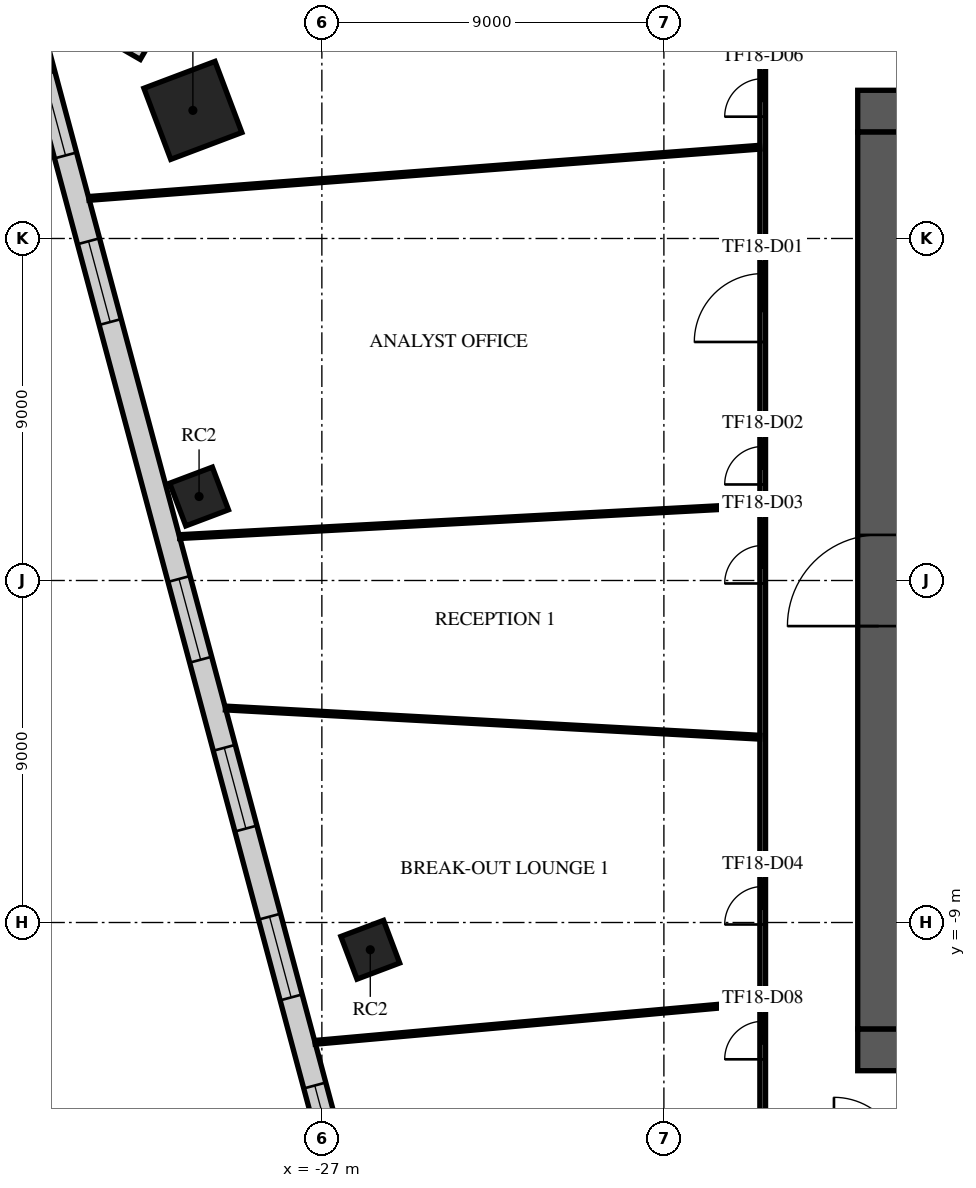
"""IFC4 building model, lengths in metres.
Left out: names, types, materials, properties, quantities, classifications, styles, units other than length and angle.
Written with IfcOpenShell. Run it as: python <this file> out.ifc"""

import sys

from ifc_helpers import new_model, si_unit, direction, frame, frame_2d, origin, origin_2d, place, context, subcontext, project, spatial, rectangle, extrude, element, fill, save


model = new_model("IFC4")
c1 = context("Model", 3, precision=1e-05, world=origin(), true_north=direction((0.0, 1.0)))
c2 = subcontext(c1, "Body", "Model", "MODEL_VIEW")
j1 = project(units=[si_unit("LENGTHUNIT", "METRE"), si_unit("PLANEANGLEUNIT", "RADIAN")], contexts=[c1])
p1 = place(None, origin())
s1 = spatial("IfcSite", under=j1, at=p1, CompositionType="ELEMENT")
p2 = place(p1, origin())
s2 = spatial("IfcBuilding", under=s1, at=p2, CompositionType="ELEMENT")
p3 = place(p2, frame((0.0, 0.0, 86.1)))
s3 = spatial("IfcBuildingStorey", under=s2, at=p3, CompositionType="ELEMENT", Elevation=86.1)
p4 = place(p3, frame((-30.394, 12.371, 0.0), z_axis=(0.0, 0.0, 1.0), x_axis=(0.935491525991, 0.353349125935, 0.0)))
e1 = element("IfcColumn", 1, at=p4, inside=s3, PredefinedType="COLUMN", context=c2, shape_type="SweptSolid", body=[
    extrude(rectangle(XDim=2.0, YDim=2.0, at=origin_2d()), origin(), (0.0, 0.0, 1.0), 4.0),
])
for number, where, z_axis, x_axis in (
    (2, (-30.231, 2.21, 0.0), (0.0, 0.0, 1.0), (0.935, 0.353, 0.0)),
    (3, (-25.726, -9.717, 0.0), (0.0, 0.0, 1.0), (0.935, 0.353, 0.0)),
):
    element("IfcColumn", number, at=place(p3, frame(where, z_axis=z_axis, x_axis=x_axis)), inside=s3, PredefinedType="COLUMN", context=c2, shape_type="SweptSolid", body=[
        extrude(rectangle(XDim=1.2, YDim=1.2, at=origin_2d()), origin(), (0.0, 0.0, 1.0), 4.0),
    ])
p5 = place(p3, frame((-12.9, 12.35, 0.0), z_axis=(0.0, 0.0, 1.0), x_axis=(1.0, 0.0, 0.0)))
e4 = element("IfcWall", 4, at=p5, inside=s3, PredefinedType="SHEAR", context=c2, shape_type="SweptSolid", body=[
    extrude(rectangle(XDim=25.8, YDim=1.1, at=frame_2d((12.9, 0.0))), origin(), (0.0, 0.0, 1.0), 3.58),
])
p6 = place(p5, frame((11.7, 0.0, 0.0)))
e5 = element("IfcOpeningElement", 5, at=p6, cuts=e4, PredefinedType="OPENING", context=c2, shape_type="SweptSolid", body=[
    extrude(rectangle(XDim=2.4, YDim=2.4, at=frame_2d((1.2, 1.2))), frame((0.0, 0.56, 0.0), z_axis=(0.0, -1.0, 0.0), x_axis=(1.0, 0.0, 0.0)), (0.0, 0.0, 1.0), 1.12),
])
p7 = place(p5, frame((22.525, 0.0, 0.0)))
e6 = element("IfcOpeningElement", 6, at=p7, cuts=e4, PredefinedType="OPENING", context=c2, shape_type="SweptSolid", body=[
    extrude(rectangle(XDim=1.2, YDim=2.1, at=frame_2d((0.6, 1.05))), frame((0.0, 0.56, 0.0), z_axis=(0.0, -1.0, 0.0), x_axis=(1.0, 0.0, 0.0)), (0.0, 0.0, 1.0), 1.12),
])
p8 = place(p5, frame((1.5, 0.0, 0.0)))
e7 = element("IfcOpeningElement", 7, at=p8, cuts=e4, PredefinedType="OPENING", context=c2, shape_type="SweptSolid", body=[
    extrude(rectangle(XDim=1.0, YDim=2.1, at=frame_2d((0.5, 1.05))), frame((0.0, 0.56, 0.0), z_axis=(0.0, -1.0, 0.0), x_axis=(1.0, 0.0, 0.0)), (0.0, 0.0, 1.0), 1.12),
])
p9 = place(p3, frame((-12.9, -12.35, 0.0), z_axis=(0.0, 0.0, 1.0), x_axis=(1.0, 0.0, 0.0)))
e8 = element("IfcWall", 8, at=p9, inside=s3, PredefinedType="SHEAR", context=c2, shape_type="SweptSolid", body=[
    extrude(rectangle(XDim=25.8, YDim=1.1, at=frame_2d((12.9, 0.0))), origin(), (0.0, 0.0, 1.0), 3.58),
])
p10 = place(p9, frame((7.8, 0.0, 0.0)))
e9 = element("IfcOpeningElement", 9, at=p10, cuts=e8, PredefinedType="OPENING", context=c2, shape_type="SweptSolid", body=[
    extrude(rectangle(XDim=2.0, YDim=2.1, at=frame_2d((1.0, 1.05))), frame((0.0, 0.56, 0.0), z_axis=(0.0, -1.0, 0.0), x_axis=(1.0, 0.0, 0.0)), (0.0, 0.0, 1.0), 1.12),
])
p11 = place(p9, frame((17.925, 0.0, 0.0)))
e10 = element("IfcOpeningElement", 10, at=p11, cuts=e8, PredefinedType="OPENING", context=c2, shape_type="SweptSolid", body=[
    extrude(rectangle(XDim=1.2, YDim=2.1, at=frame_2d((0.6, 1.05))), frame((0.0, 0.56, 0.0), z_axis=(0.0, -1.0, 0.0), x_axis=(1.0, 0.0, 0.0)), (0.0, 0.0, 1.0), 1.12),
])
p12 = place(p9, frame((2.075, 0.0, 0.0)))
e11 = element("IfcOpeningElement", 11, at=p12, cuts=e8, PredefinedType="OPENING", context=c2, shape_type="SweptSolid", body=[
    extrude(rectangle(XDim=1.2, YDim=2.1, at=frame_2d((0.6, 1.05))), frame((0.0, 0.56, 0.0), z_axis=(0.0, -1.0, 0.0), x_axis=(1.0, 0.0, 0.0)), (0.0, 0.0, 1.0), 1.12),
])
p13 = place(p9, frame((22.525, 0.0, 0.0)))
e12 = element("IfcOpeningElement", 12, at=p13, cuts=e8, PredefinedType="OPENING", context=c2, shape_type="SweptSolid", body=[
    extrude(rectangle(XDim=1.2, YDim=2.1, at=frame_2d((0.6, 1.05))), frame((0.0, 0.56, 0.0), z_axis=(0.0, -1.0, 0.0), x_axis=(1.0, 0.0, 0.0)), (0.0, 0.0, 1.0), 1.12),
])
p14 = place(p3, frame((-12.35, -11.8, 0.0), z_axis=(0.0, 0.0, 1.0), x_axis=(0.0, 1.0, 0.0)))
e13 = element("IfcWall", 13, at=p14, inside=s3, PredefinedType="SHEAR", context=c2, shape_type="SweptSolid", body=[
    extrude(rectangle(XDim=23.6, YDim=1.1, at=frame_2d((11.8, 0.0))), origin(), (0.0, 0.0, 1.0), 3.58),
])
p15 = place(p14, frame((10.6, 0.0, 0.0)))
e14 = element("IfcOpeningElement", 14, at=p15, cuts=e13, PredefinedType="OPENING", context=c2, shape_type="SweptSolid", body=[
    extrude(rectangle(XDim=2.4, YDim=2.4, at=frame_2d((1.2, 1.2))), frame((0.0, 0.56, 0.0), z_axis=(0.0, -1.0, 0.0), x_axis=(1.0, 0.0, 0.0)), (0.0, 0.0, 1.0), 1.12),
])
p16 = place(p3, frame((-31.628, 13.972, 0.0), z_axis=(0.0, 0.0, 1.0), x_axis=(-0.866022959057, 0.500004234368, 0.0)))
e15 = element("IfcWall", 15, at=p16, inside=s3, PredefinedType="STANDARD", context=c2, shape_type="SweptSolid", body=[
    extrude(rectangle(XDim=2.5, YDim=0.6, at=frame_2d((1.25, 0.0))), origin(), (0.0, 0.0, 1.0), 3.58),
])
p17 = place(p3, frame((-34.609, 14.409, 0.0), z_axis=(0.0, 0.0, 1.0), x_axis=(0.258818949408, -0.96592585193, 0.0)))
e16 = element("IfcWall", 16, at=p17, inside=s3, PredefinedType="STANDARD", context=c2, shape_type="SweptSolid", body=[
    extrude(rectangle(XDim=45.751, YDim=0.6, at=frame_2d((22.875, 0.0))), origin(), (0.0, 0.0, 1.0), 3.58),
])
p18 = place(p17, frame((1.138, 0.0, 0.9)))
e17 = element("IfcOpeningElement", 17, at=p18, cuts=e16, PredefinedType="OPENING", context=c2, shape_type="SweptSolid", body=[
    extrude(rectangle(XDim=2.2, YDim=2.1, at=frame_2d((1.1, 1.05))), frame((0.0, 0.31, 0.0), z_axis=(0.0, -1.0, 0.0), x_axis=(1.0, 0.0, 0.0)), (0.0, 0.0, 1.0), 0.62),
])
p19 = place(p17, frame((5.676, 0.0, 0.9)))
e18 = element("IfcOpeningElement", 18, at=p19, cuts=e16, PredefinedType="OPENING", context=c2, shape_type="SweptSolid", body=[
    extrude(rectangle(XDim=2.2, YDim=2.1, at=frame_2d((1.1, 1.05))), frame((0.0, 0.31, 0.0), z_axis=(0.0, -1.0, 0.0), x_axis=(1.0, 0.0, 0.0)), (0.0, 0.0, 1.0), 0.62),
])
p20 = place(p17, frame((14.876, 0.0, 0.9)))
e19 = element("IfcOpeningElement", 19, at=p20, cuts=e16, PredefinedType="OPENING", context=c2, shape_type="SweptSolid", body=[
    extrude(rectangle(XDim=2.2, YDim=2.1, at=frame_2d((1.1, 1.05))), frame((0.0, 0.31, 0.0), z_axis=(0.0, -1.0, 0.0), x_axis=(1.0, 0.0, 0.0)), (0.0, 0.0, 1.0), 0.62),
])
p21 = place(p17, frame((19.476, 0.0, 0.9)))
e20 = element("IfcOpeningElement", 20, at=p21, cuts=e16, PredefinedType="OPENING", context=c2, shape_type="SweptSolid", body=[
    extrude(rectangle(XDim=2.2, YDim=2.1, at=frame_2d((1.1, 1.05))), frame((0.0, 0.31, 0.0), z_axis=(0.0, -1.0, 0.0), x_axis=(1.0, 0.0, 0.0)), (0.0, 0.0, 1.0), 0.62),
])
p22 = place(p17, frame((24.076, 0.0, 0.9)))
e21 = element("IfcOpeningElement", 21, at=p22, cuts=e16, PredefinedType="OPENING", context=c2, shape_type="SweptSolid", body=[
    extrude(rectangle(XDim=2.2, YDim=2.1, at=frame_2d((1.1, 1.05))), frame((0.0, 0.31, 0.0), z_axis=(0.0, -1.0, 0.0), x_axis=(1.0, 0.0, 0.0)), (0.0, 0.0, 1.0), 0.62),
])
p23 = place(p17, frame((28.676, 0.0, 0.9)))
e22 = element("IfcOpeningElement", 22, at=p23, cuts=e16, PredefinedType="OPENING", context=c2, shape_type="SweptSolid", body=[
    extrude(rectangle(XDim=2.2, YDim=2.1, at=frame_2d((1.1, 1.05))), frame((0.0, 0.31, 0.0), z_axis=(0.0, -1.0, 0.0), x_axis=(1.0, 0.0, 0.0)), (0.0, 0.0, 1.0), 0.62),
])
p24 = place(p17, frame((33.276, 0.0, 0.9)))
e23 = element("IfcOpeningElement", 23, at=p24, cuts=e16, PredefinedType="OPENING", context=c2, shape_type="SweptSolid", body=[
    extrude(rectangle(XDim=2.2, YDim=2.1, at=frame_2d((1.1, 1.05))), frame((0.0, 0.31, 0.0), z_axis=(0.0, -1.0, 0.0), x_axis=(1.0, 0.0, 0.0)), (0.0, 0.0, 1.0), 0.62),
])
p25 = place(p17, frame((37.876, 0.0, 0.9)))
e24 = element("IfcOpeningElement", 24, at=p25, cuts=e16, PredefinedType="OPENING", context=c2, shape_type="SweptSolid", body=[
    extrude(rectangle(XDim=2.2, YDim=2.1, at=frame_2d((1.1, 1.05))), frame((0.0, 0.31, 0.0), z_axis=(0.0, -1.0, 0.0), x_axis=(1.0, 0.0, 0.0)), (0.0, 0.0, 1.0), 0.62),
])
p26 = place(p17, frame((42.414, 0.0, 0.9)))
e25 = element("IfcOpeningElement", 25, at=p26, cuts=e16, PredefinedType="OPENING", context=c2, shape_type="SweptSolid", body=[
    extrude(rectangle(XDim=2.2, YDim=2.1, at=frame_2d((1.1, 1.05))), frame((0.0, 0.31, 0.0), z_axis=(0.0, -1.0, 0.0), x_axis=(1.0, 0.0, 0.0)), (0.0, 0.0, 1.0), 0.62),
])
p27 = place(p3, frame((-15.4, -15.4, 0.0), z_axis=(0.0, 0.0, 1.0), x_axis=(0.0, 1.0, 0.0)))
e26 = element("IfcWall", 26, at=p27, inside=s3, PredefinedType="PARTITIONING", context=c2, shape_type="SweptSolid", body=[
    extrude(rectangle(XDim=30.8, YDim=0.15, at=frame_2d((15.4, 0.0))), origin(), (0.0, 0.0, 1.0), 3.08),
])
p28 = place(p27, frame((21.677, 0.0, 0.0)))
e27 = element("IfcOpeningElement", 27, at=p28, cuts=e26, PredefinedType="OPENING", context=c2, shape_type="SweptSolid", body=[
    extrude(rectangle(XDim=1.8, YDim=2.1, at=frame_2d((0.9, 1.05))), frame((0.0, 0.085, 0.0), z_axis=(0.0, -1.0, 0.0), x_axis=(1.0, 0.0, 0.0)), (0.0, 0.0, 1.0), 0.17),
])
p29 = place(p27, frame((17.927, 0.0, 0.0)))
e28 = element("IfcOpeningElement", 28, at=p29, cuts=e26, PredefinedType="OPENING", context=c2, shape_type="SweptSolid", body=[
    extrude(rectangle(XDim=1.0, YDim=2.1, at=frame_2d((0.5, 1.05))), frame((0.0, 0.085, 0.0), z_axis=(0.0, -1.0, 0.0), x_axis=(1.0, 0.0, 0.0)), (0.0, 0.0, 1.0), 0.17),
])
p30 = place(p27, frame((15.322, 0.0, 0.0)))
e29 = element("IfcOpeningElement", 29, at=p30, cuts=e26, PredefinedType="OPENING", context=c2, shape_type="SweptSolid", body=[
    extrude(rectangle(XDim=1.0, YDim=2.1, at=frame_2d((0.5, 1.05))), frame((0.0, 0.085, 0.0), z_axis=(0.0, -1.0, 0.0), x_axis=(1.0, 0.0, 0.0)), (0.0, 0.0, 1.0), 0.17),
])
p31 = place(p27, frame((6.348, 0.0, 0.0)))
e30 = element("IfcOpeningElement", 30, at=p31, cuts=e26, PredefinedType="OPENING", context=c2, shape_type="SweptSolid", body=[
    extrude(rectangle(XDim=1.0, YDim=2.1, at=frame_2d((0.5, 1.05))), frame((0.0, 0.085, 0.0), z_axis=(0.0, -1.0, 0.0), x_axis=(1.0, 0.0, 0.0)), (0.0, 0.0, 1.0), 0.17),
])
p32 = place(p27, frame((27.605, 0.0, 0.0)))
e31 = element("IfcOpeningElement", 31, at=p32, cuts=e26, PredefinedType="OPENING", context=c2, shape_type="SweptSolid", body=[
    extrude(rectangle(XDim=1.0, YDim=2.1, at=frame_2d((0.5, 1.05))), frame((0.0, 0.085, 0.0), z_axis=(0.0, -1.0, 0.0), x_axis=(1.0, 0.0, 0.0)), (0.0, 0.0, 1.0), 0.17),
])
p33 = place(p27, frame((2.8, 0.0, 0.0)))
e32 = element("IfcOpeningElement", 32, at=p33, cuts=e26, PredefinedType="OPENING", context=c2, shape_type="SweptSolid", body=[
    extrude(rectangle(XDim=1.0, YDim=2.1, at=frame_2d((0.5, 1.05))), frame((0.0, 0.085, 0.0), z_axis=(0.0, -1.0, 0.0), x_axis=(1.0, 0.0, 0.0)), (0.0, 0.0, 1.0), 0.17),
])
p34 = place(p3, frame((-33.129, 10.055, 0.0), z_axis=(0.0, 0.0, 1.0), x_axis=(0.997098857085, 0.076117469739, 0.0)))
e33 = element("IfcWall", 33, at=p34, inside=s3, PredefinedType="PARTITIONING", context=c2, shape_type="SweptSolid", body=[
    extrude(rectangle(XDim=17.702, YDim=0.1, at=frame_2d((8.851, 0.0))), origin(), (0.0, 0.0, 1.0), 3.58),
])
p35 = place(p3, frame((-30.744, 1.155, 0.0), z_axis=(0.0, 0.0, 1.0), x_axis=(0.998561238881, 0.053623243142, 0.0)))
e34 = element("IfcWall", 34, at=p35, inside=s3, PredefinedType="PARTITIONING", context=c2, shape_type="SweptSolid", body=[
    extrude(rectangle(XDim=15.289, YDim=0.1, at=frame_2d((7.644, 0.0))), origin(), (0.0, 0.0, 1.0), 2.96),
])
p36 = place(p3, frame((-29.536, -3.355, 0.0), z_axis=(0.0, 0.0, 1.0), x_axis=(0.998509889637, -0.054571057322, 0.0)))
e35 = element("IfcWall", 35, at=p36, inside=s3, PredefinedType="PARTITIONING", context=c2, shape_type="SweptSolid", body=[
    extrude(rectangle(XDim=14.079, YDim=0.1, at=frame_2d((7.04, 0.0))), origin(), (0.0, 0.0, 1.0), 3.08),
])
p37 = place(p3, frame((-27.178, -12.154, 0.0), z_axis=(0.0, 0.0, 1.0), x_axis=(0.996016470741, 0.089169445512, 0.0)))
e36 = element("IfcWall", 36, at=p37, inside=s3, PredefinedType="PARTITIONING", context=c2, shape_type="SweptSolid", body=[
    extrude(rectangle(XDim=11.746, YDim=0.1, at=frame_2d((5.873, 0.0))), origin(), (0.0, 0.0, 1.0), 3.58),
])
p38 = place(p15, origin())
e37 = element("IfcDoor", 37, at=p38, inside=s3, OperationType="SINGLE_SWING_LEFT", PredefinedType="DOOR", context=c2, shape_type="SweptSolid", body=[
    extrude(rectangle(XDim=2.4, YDim=2.4, at=frame_2d((1.2, 1.2))), frame((0.0, 0.025, 0.0), z_axis=(0.0, -1.0, 0.0), x_axis=(1.0, 0.0, 0.0)), (0.0, 0.0, 1.0), 0.05),
])
fill(e14, e37)
p39 = place(p18, origin())
e38 = element("IfcWindow", 38, at=p39, inside=s3, PartitioningType="SINGLE_PANEL", PredefinedType="WINDOW", context=c2, shape_type="SweptSolid", body=[
    extrude(rectangle(XDim=2.2, YDim=2.1, at=frame_2d((1.1, 1.05))), frame((0.0, 0.03, 0.0), z_axis=(0.0, -1.0, 0.0), x_axis=(1.0, 0.0, 0.0)), (0.0, 0.0, 1.0), 0.06),
])
fill(e17, e38)
p40 = place(p19, origin())
e39 = element("IfcWindow", 39, at=p40, inside=s3, PartitioningType="SINGLE_PANEL", PredefinedType="WINDOW", context=c2, shape_type="SweptSolid", body=[
    extrude(rectangle(XDim=2.2, YDim=2.1, at=frame_2d((1.1, 1.05))), frame((0.0, 0.03, 0.0), z_axis=(0.0, -1.0, 0.0), x_axis=(1.0, 0.0, 0.0)), (0.0, 0.0, 1.0), 0.06),
])
fill(e18, e39)
p41 = place(p20, origin())
e40 = element("IfcWindow", 40, at=p41, inside=s3, PartitioningType="SINGLE_PANEL", PredefinedType="WINDOW", context=c2, shape_type="SweptSolid", body=[
    extrude(rectangle(XDim=2.2, YDim=2.1, at=frame_2d((1.1, 1.05))), frame((0.0, 0.03, 0.0), z_axis=(0.0, -1.0, 0.0), x_axis=(1.0, 0.0, 0.0)), (0.0, 0.0, 1.0), 0.06),
])
fill(e19, e40)
p42 = place(p21, origin())
e41 = element("IfcWindow", 41, at=p42, inside=s3, PartitioningType="SINGLE_PANEL", PredefinedType="WINDOW", context=c2, shape_type="SweptSolid", body=[
    extrude(rectangle(XDim=2.2, YDim=2.1, at=frame_2d((1.1, 1.05))), frame((0.0, 0.03, 0.0), z_axis=(0.0, -1.0, 0.0), x_axis=(1.0, 0.0, 0.0)), (0.0, 0.0, 1.0), 0.06),
])
fill(e20, e41)
p43 = place(p22, origin())
e42 = element("IfcWindow", 42, at=p43, inside=s3, PartitioningType="SINGLE_PANEL", PredefinedType="WINDOW", context=c2, shape_type="SweptSolid", body=[
    extrude(rectangle(XDim=2.2, YDim=2.1, at=frame_2d((1.1, 1.05))), frame((0.0, 0.03, 0.0), z_axis=(0.0, -1.0, 0.0), x_axis=(1.0, 0.0, 0.0)), (0.0, 0.0, 1.0), 0.06),
])
fill(e21, e42)
p44 = place(p23, origin())
e43 = element("IfcWindow", 43, at=p44, inside=s3, PartitioningType="SINGLE_PANEL", PredefinedType="WINDOW", context=c2, shape_type="SweptSolid", body=[
    extrude(rectangle(XDim=2.2, YDim=2.1, at=frame_2d((1.1, 1.05))), frame((0.0, 0.03, 0.0), z_axis=(0.0, -1.0, 0.0), x_axis=(1.0, 0.0, 0.0)), (0.0, 0.0, 1.0), 0.06),
])
fill(e22, e43)
p45 = place(p28, origin())
e44 = element("IfcDoor", 44, at=p45, inside=s3, OperationType="DOUBLE_DOOR_SINGLE_SWING", PredefinedType="DOOR", context=c2, shape_type="SweptSolid", body=[
    extrude(rectangle(XDim=1.8, YDim=2.1, at=frame_2d((0.9, 1.05))), frame((0.0, 0.025, 0.0), z_axis=(0.0, -1.0, 0.0), x_axis=(1.0, 0.0, 0.0)), (0.0, 0.0, 1.0), 0.05),
])
fill(e27, e44)
p46 = place(p29, origin())
e45 = element("IfcDoor", 45, at=p46, inside=s3, OperationType="SINGLE_SWING_RIGHT", PredefinedType="DOOR", context=c2, shape_type="SweptSolid", body=[
    extrude(rectangle(XDim=1.0, YDim=2.1, at=frame_2d((0.5, 1.05))), frame((0.0, 0.025, 0.0), z_axis=(0.0, -1.0, 0.0), x_axis=(1.0, 0.0, 0.0)), (0.0, 0.0, 1.0), 0.05),
])
fill(e28, e45)
p47 = place(p30, origin())
e46 = element("IfcDoor", 46, at=p47, inside=s3, OperationType="SINGLE_SWING_LEFT", PredefinedType="DOOR", context=c2, shape_type="SweptSolid", body=[
    extrude(rectangle(XDim=1.0, YDim=2.1, at=frame_2d((0.5, 1.05))), frame((0.0, 0.025, 0.0), z_axis=(0.0, -1.0, 0.0), x_axis=(1.0, 0.0, 0.0)), (0.0, 0.0, 1.0), 0.05),
])
fill(e29, e46)
p48 = place(p31, origin())
e47 = element("IfcDoor", 47, at=p48, inside=s3, OperationType="SINGLE_SWING_RIGHT", PredefinedType="DOOR", context=c2, shape_type="SweptSolid", body=[
    extrude(rectangle(XDim=1.0, YDim=2.1, at=frame_2d((0.5, 1.05))), frame((0.0, 0.025, 0.0), z_axis=(0.0, -1.0, 0.0), x_axis=(1.0, 0.0, 0.0)), (0.0, 0.0, 1.0), 0.05),
])
fill(e30, e47)
p49 = place(p32, origin())
e48 = element("IfcDoor", 48, at=p49, inside=s3, OperationType="SINGLE_SWING_RIGHT", PredefinedType="DOOR", context=c2, shape_type="SweptSolid", body=[
    extrude(rectangle(XDim=1.0, YDim=2.1, at=frame_2d((0.5, 1.05))), frame((0.0, 0.025, 0.0), z_axis=(0.0, -1.0, 0.0), x_axis=(1.0, 0.0, 0.0)), (0.0, 0.0, 1.0), 0.05),
])
fill(e31, e48)
p50 = place(p33, origin())
e49 = element("IfcDoor", 49, at=p50, inside=s3, OperationType="SINGLE_SWING_LEFT", PredefinedType="DOOR", context=c2, shape_type="SweptSolid", body=[
    extrude(rectangle(XDim=1.0, YDim=2.1, at=frame_2d((0.5, 1.05))), frame((0.0, 0.025, 0.0), z_axis=(0.0, -1.0, 0.0), x_axis=(1.0, 0.0, 0.0)), (0.0, 0.0, 1.0), 0.05),
])
fill(e32, e49)
save(model, sys.argv[1])
